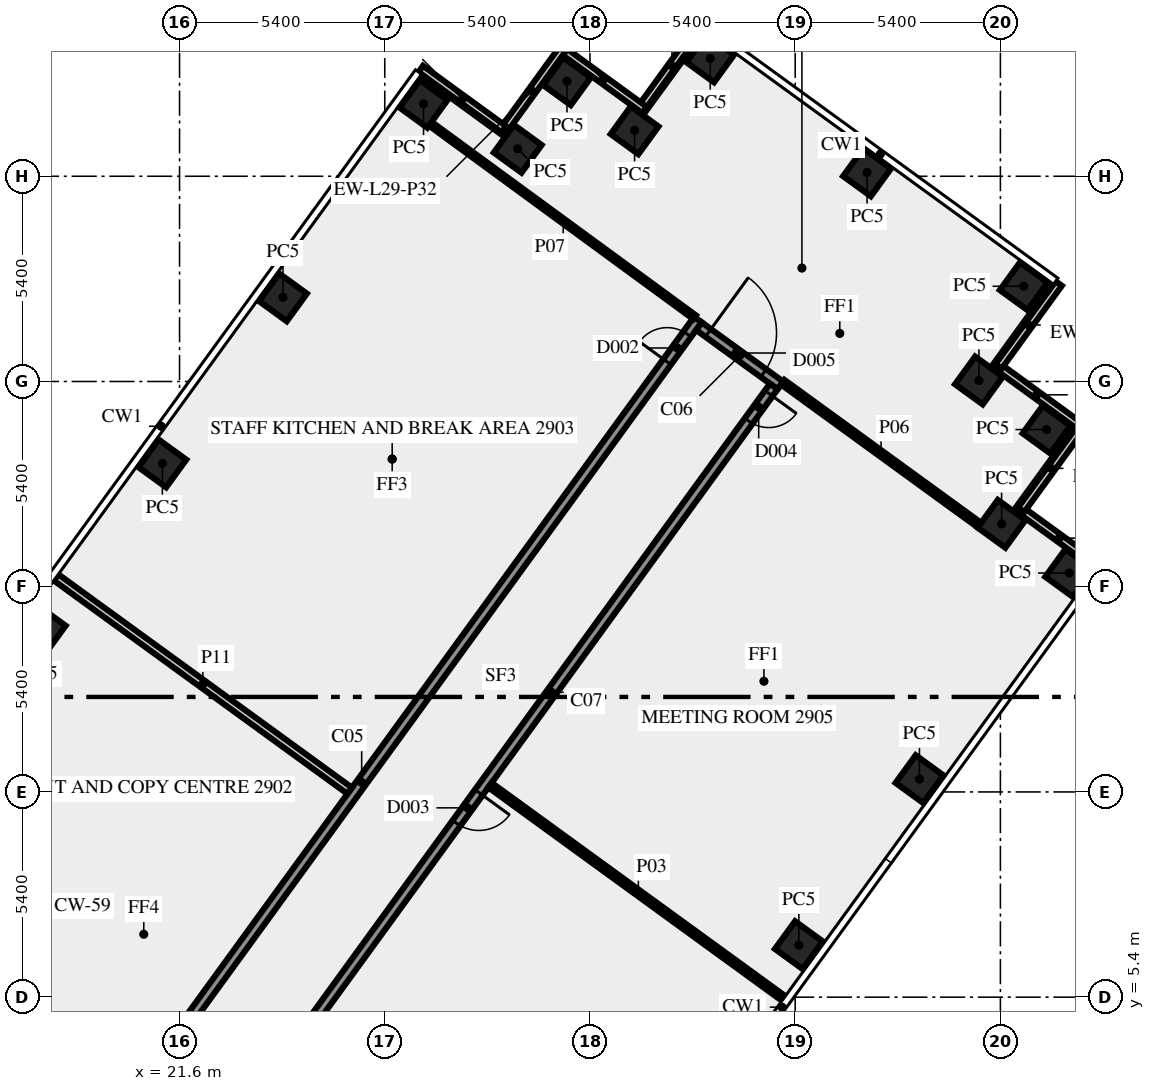
"""IFC4 building model, lengths in metres.
Left out: names, types, materials, properties, quantities, classifications, styles, units other than length and angle.
Written with IfcOpenShell. Run it as: python <this file> out.ifc"""

import sys

from ifc_helpers import new_model, si_unit, direction, frame, frame_2d, origin, origin_2d, place, context, subcontext, project, spatial, rectangle, extrude, element, fill, save


model = new_model("IFC4")
c1 = context("Model", 3, precision=1e-05, world=origin(), true_north=direction((0.0, 1.0)))
c2 = subcontext(c1, "Body", "Model", "MODEL_VIEW")
j1 = project(units=[si_unit("LENGTHUNIT", "METRE"), si_unit("PLANEANGLEUNIT", "RADIAN")], contexts=[c1])
p1 = place(None, origin())
s1 = spatial("IfcSite", under=j1, at=p1, CompositionType="ELEMENT")
p2 = place(p1, origin())
s2 = spatial("IfcBuilding", under=s1, at=p2, CompositionType="ELEMENT")
p3 = place(p2, frame((0.0, 0.0, 125.0)))
s3 = spatial("IfcBuildingStorey", under=s2, at=p3, CompositionType="ELEMENT", Elevation=125.0)
for number, where, z_axis, x_axis in (
    (1, (37.896, 6.769, 0.0), (0.0, 0.0, 1.0), (0.588, 0.809, 0.0)),
    (2, (41.07, 11.137, 0.0), (0.0, 0.0, 1.0), (0.588, 0.809, 0.0)),
    (3, (45.01, 16.56, 0.0), (0.0, 0.0, 1.0), (0.588, 0.809, 0.0)),
    (4, (43.231, 17.854, 0.0), (0.0, 0.0, 1.0), (0.588, 0.809, 0.0)),
    (5, (44.415, 20.335, 0.0), (0.0, 0.0, 1.0), (0.588, 0.809, 0.0)),
    (6, (42.635, 21.626, 0.0), (0.0, 0.0, 1.0), (-0.809, 0.588, 0.0)),
    (7, (43.815, 24.105, 0.0), (0.0, 0.0, 1.0), (-0.809, 0.588, 0.0)),
    (8, (39.691, 27.102, 0.0), (0.0, 0.0, 1.0), (-0.809, 0.588, 0.0)),
    (9, (35.565, 30.1, 0.0), (0.0, 0.0, 1.0), (-0.588, -0.809, 0.0)),
    (10, (33.574, 28.209, 0.0), (0.0, 0.0, 1.0), (-0.809, 0.588, 0.0)),
    (11, (31.795, 29.5, 0.0), (0.0, 0.0, 1.0), (-0.588, -0.809, 0.0)),
    (12, (30.499, 27.723, 0.0), (0.0, 0.0, 1.0), (-0.809, 0.588, 0.0)),
    (13, (28.02, 28.905, 0.0), (0.0, 0.0, 1.0), (-0.809, 0.588, 0.0)),
    (14, (24.321, 23.812, 0.0), (0.0, 0.0, 1.0), (-0.588, -0.809, 0.0)),
    (15, (21.147, 19.444, 0.0), (0.0, 0.0, 1.0), (-0.588, -0.809, 0.0)),
    (16, (17.974, 15.075, 0.0), (0.0, 0.0, 1.0), (-0.588, -0.809, 0.0)),
):
    element("IfcColumn", number, at=place(p3, frame(where, z_axis=z_axis, x_axis=x_axis)), inside=s3, PredefinedType="COLUMN", context=c2, shape_type="SweptSolid", body=[
        extrude(rectangle(XDim=0.9, YDim=0.9, at=origin_2d()), origin(), (0.0, 0.0, 1.0), 3.65),
    ])
for number, where, z_axis, x_axis in (
    (17, (45.842, 16.685, 0.0), (0.0, 0.0, 1.0), (-0.809, 0.588, 0.0)),
    (18, (43.746, 18.223, 0.0), (0.0, 0.0, 1.0), (0.588, 0.809, 0.0)),
    (19, (45.245, 20.456, 0.0), (0.0, 0.0, 1.0), (-0.809, 0.588, 0.0)),
    (20, (43.149, 21.994, 0.0), (0.0, 0.0, 1.0), (0.588, 0.809, 0.0)),
    (21, (35.351, 30.997, 0.0), (0.0, 0.0, 1.0), (-0.588, -0.809, 0.0)),
    (22, (33.838, 28.744, 0.0), (0.0, 0.0, 1.0), (-0.809, 0.588, 0.0)),
    (23, (31.67, 30.333, 0.0), (0.0, 0.0, 1.0), (-0.588, -0.809, 0.0)),
    (24, (30.133, 28.237, 0.0), (0.0, 0.0, 1.0), (-0.809, 0.588, 0.0)),
):
    element("IfcWall", number, at=place(p3, frame(where, z_axis=z_axis, x_axis=x_axis)), inside=s3, PredefinedType="SOLIDWALL", context=c2, shape_type="SweptSolid", body=[
        extrude(rectangle(XDim=2.7, YDim=0.2, at=frame_2d((1.35, 0.0))), origin(), (0.0, 0.0, 1.0), 3.65),
    ])
p4 = place(p3, frame((17.545, -1.125, 0.0), z_axis=(0.0, 0.0, 1.0), x_axis=(0.587786330937, 0.809016210693, 0.0)))
e25 = element("IfcWall", 25, at=p4, inside=s3, PredefinedType="SOLIDWALL", context=c2, shape_type="SweptSolid", body=[
    extrude(rectangle(XDim=30.103, YDim=0.25, at=frame_2d((15.052, 0.0))), origin(), (0.0, 0.0, 1.0), 3.65),
])
p5 = place(p4, frame((3.441, 0.0, 0.0)))
e26 = element("IfcOpeningElement", 26, at=p5, cuts=e25, PredefinedType="OPENING", context=c2, shape_type="SweptSolid", body=[
    extrude(rectangle(XDim=0.9, YDim=2.1, at=frame_2d((0.45, 1.05))), frame((0.0, 0.135, 0.0), z_axis=(0.0, -1.0, 0.0), x_axis=(1.0, 0.0, 0.0)), (0.0, 0.0, 1.0), 0.27),
])
p6 = place(p4, frame((28.729, 0.0, 0.0)))
e27 = element("IfcOpeningElement", 27, at=p6, cuts=e25, PredefinedType="OPENING", context=c2, shape_type="SweptSolid", body=[
    extrude(rectangle(XDim=0.9, YDim=2.1, at=frame_2d((0.45, 1.05))), frame((0.0, 0.135, 0.0), z_axis=(0.0, -1.0, 0.0), x_axis=(1.0, 0.0, 0.0)), (0.0, 0.0, 1.0), 0.27),
])
p7 = place(p3, frame((35.267, 23.054, 0.0), z_axis=(0.0, 0.0, 1.0), x_axis=(0.809038743598, -0.587755315891, 0.0)))
e28 = element("IfcWall", 28, at=p7, inside=s3, PredefinedType="SOLIDWALL", context=c2, shape_type="SweptSolid", body=[
    extrude(rectangle(XDim=2.65, YDim=0.25, at=frame_2d((1.325, 0.0))), origin(), (0.0, 0.0, 1.0), 3.65),
])
p8 = place(p7, frame((0.3, 0.0, 0.0)))
e29 = element("IfcOpeningElement", 29, at=p8, cuts=e28, PredefinedType="OPENING", context=c2, shape_type="SweptSolid", body=[
    extrude(rectangle(XDim=1.8, YDim=2.1, at=frame_2d((0.9, 1.05))), frame((0.0, 0.135, 0.0), z_axis=(0.0, -1.0, 0.0), x_axis=(1.0, 0.0, 0.0)), (0.0, 0.0, 1.0), 0.27),
])
p9 = place(p3, frame((37.236, 21.469, 0.0), z_axis=(0.0, 0.0, 1.0), x_axis=(-0.58778344073, -0.809018310549, 0.0)))
e30 = element("IfcWall", 30, at=p9, inside=s3, PredefinedType="SOLIDWALL", context=c2, shape_type="SweptSolid", body=[
    extrude(rectangle(XDim=28.42, YDim=0.25, at=frame_2d((14.21, 0.0))), origin(), (0.0, 0.0, 1.0), 3.65),
])
p10 = place(p9, frame((13.205, 0.0, 0.0)))
e31 = element("IfcOpeningElement", 31, at=p10, cuts=e30, PredefinedType="OPENING", context=c2, shape_type="SweptSolid", body=[
    extrude(rectangle(XDim=1.0, YDim=2.1, at=frame_2d((0.5, 1.05))), frame((0.0, 0.135, 0.0), z_axis=(0.0, -1.0, 0.0), x_axis=(1.0, 0.0, 0.0)), (0.0, 0.0, 1.0), 0.27),
])
p11 = place(p9, frame((0.224, 0.0, 0.0)))
e32 = element("IfcOpeningElement", 32, at=p11, cuts=e30, PredefinedType="OPENING", context=c2, shape_type="SweptSolid", body=[
    extrude(rectangle(XDim=0.9, YDim=2.1, at=frame_2d((0.45, 1.05))), frame((0.0, 0.135, 0.0), z_axis=(0.0, -1.0, 0.0), x_axis=(1.0, 0.0, 0.0)), (0.0, 0.0, 1.0), 0.27),
])
p12 = place(p3, frame((37.577, 5.307, 0.0), z_axis=(0.0, 0.0, 1.0), x_axis=(-0.809032429128, 0.587764007591, 0.0)))
e33 = element("IfcWall", 33, at=p12, inside=s3, PredefinedType="PARTITIONING", context=c2, shape_type="SweptSolid", body=[
    extrude(rectangle(XDim=9.651, YDim=0.15, at=frame_2d((4.826, 0.0))), origin(), (0.0, 0.0, 1.0), 2.75),
])
p13 = place(p3, frame((42.646, 17.823, 0.0), z_axis=(0.0, 0.0, 1.0), x_axis=(-0.80900675786, 0.587799341388, 0.0)))
e34 = element("IfcWall", 34, at=p13, inside=s3, PredefinedType="PARTITIONING", context=c2, shape_type="SweptSolid", body=[
    extrude(rectangle(XDim=6.395, YDim=0.15, at=frame_2d((3.197, 0.0))), origin(), (0.0, 0.0, 1.0), 3.65),
])
p14 = place(p3, frame((28.238, 28.352, 0.0), z_axis=(0.0, 0.0, 1.0), x_axis=(0.806980651863, -0.590577875913, 0.0)))
e35 = element("IfcWall", 35, at=p14, inside=s3, PredefinedType="PARTITIONING", context=c2, shape_type="SweptSolid", body=[
    extrude(rectangle(XDim=8.57, YDim=0.12, at=frame_2d((4.285, 0.0))), origin(), (0.0, 0.0, 1.0), 3.65),
])
p15 = place(p3, frame((26.077, 10.832, 0.0), z_axis=(0.0, 0.0, 1.0), x_axis=(-0.809052142986, 0.587736871338, 0.0)))
e36 = element("IfcWall", 36, at=p15, inside=s3, PredefinedType="SOLIDWALL", context=c2, shape_type="SweptSolid", body=[
    extrude(rectangle(XDim=9.55, YDim=0.2, at=frame_2d((4.775, 0.0))), origin(), (0.0, 0.0, 1.0), 2.75),
])
p16 = place(p10, origin())
e37 = element("IfcDoor", 37, at=p16, inside=s3, OperationType="SINGLE_SWING_LEFT", PredefinedType="DOOR", context=c2, shape_type="SweptSolid", body=[
    extrude(rectangle(XDim=1.0, YDim=2.1, at=frame_2d((0.5, 1.05))), frame((0.0, 0.025, 0.0), z_axis=(0.0, -1.0, 0.0), x_axis=(1.0, 0.0, 0.0)), (0.0, 0.0, 1.0), 0.05),
])
fill(e31, e37)
p17 = place(p11, origin())
e38 = element("IfcDoor", 38, at=p17, inside=s3, OperationType="SINGLE_SWING_LEFT", PredefinedType="DOOR", context=c2, shape_type="SweptSolid", body=[
    extrude(rectangle(XDim=0.9, YDim=2.1, at=frame_2d((0.45, 1.05))), frame((0.0, 0.025, 0.0), z_axis=(0.0, -1.0, 0.0), x_axis=(1.0, 0.0, 0.0)), (0.0, 0.0, 1.0), 0.05),
])
fill(e32, e38)
p18 = place(p8, origin())
e39 = element("IfcDoor", 39, at=p18, inside=s3, OperationType="DOUBLE_DOOR_SINGLE_SWING", PredefinedType="DOOR", context=c2, shape_type="SweptSolid", body=[
    extrude(rectangle(XDim=1.8, YDim=2.1, at=frame_2d((0.9, 1.05))), frame((0.0, 0.025, 0.0), z_axis=(0.0, -1.0, 0.0), x_axis=(1.0, 0.0, 0.0)), (0.0, 0.0, 1.0), 0.05),
])
fill(e29, e39)
p19 = place(p6, origin())
e40 = element("IfcDoor", 40, at=p19, inside=s3, OperationType="SINGLE_SWING_RIGHT", PredefinedType="DOOR", context=c2, shape_type="SweptSolid", body=[
    extrude(rectangle(XDim=0.9, YDim=2.1, at=frame_2d((0.45, 1.05))), frame((0.0, 0.025, 0.0), z_axis=(0.0, -1.0, 0.0), x_axis=(1.0, 0.0, 0.0)), (0.0, 0.0, 1.0), 0.05),
])
fill(e27, e40)
save(model, sys.argv[1])
